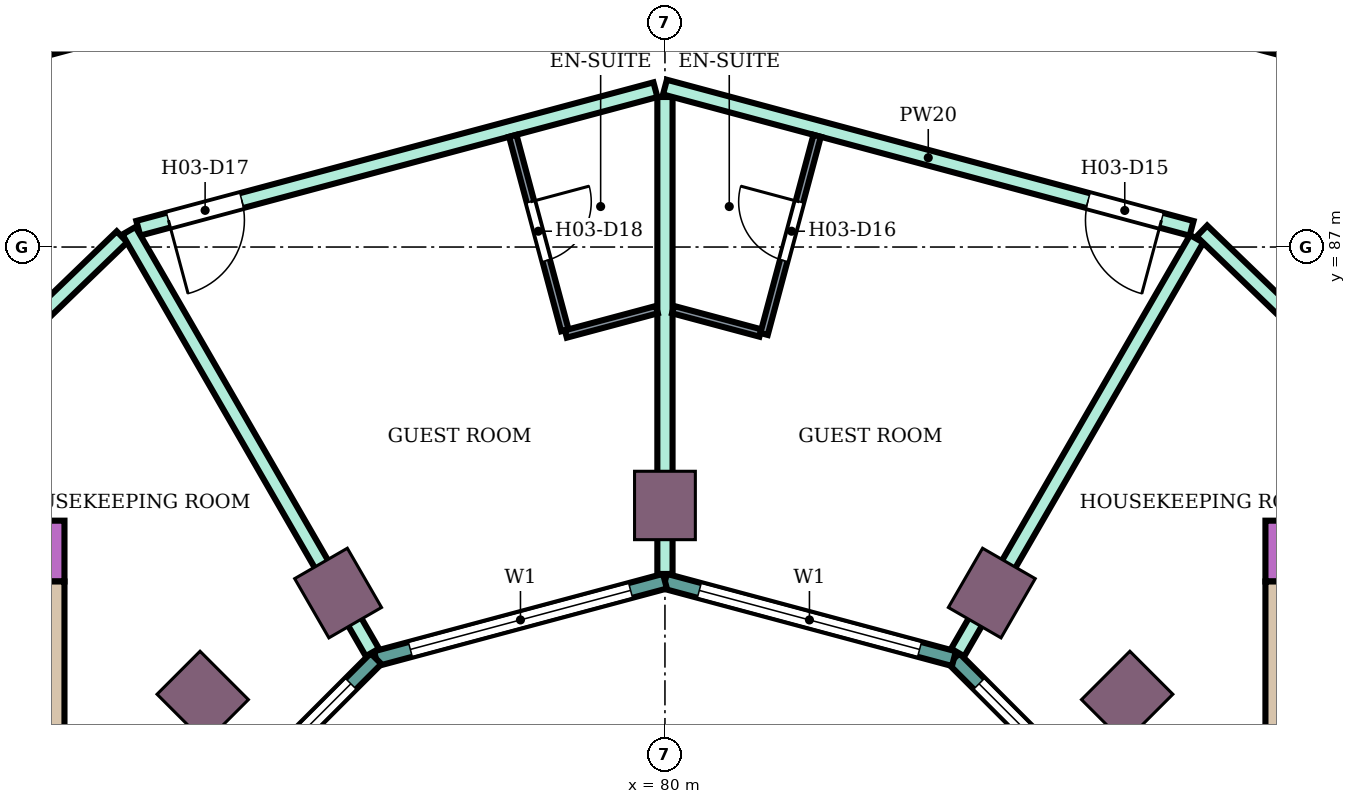
"""IFC4 building model, lengths in metres.
Left out: names, types, materials, properties, quantities, classifications, styles, units other than length and angle.
Written with IfcOpenShell. Run it as: python <this file> out.ifc"""

import sys

from ifc_helpers import new_model, si_unit, direction, frame, frame_2d, origin, origin_2d, place, context, subcontext, project, spatial, rectangle, extrude, element, fill, save


model = new_model("IFC4")
c1 = context("Model", 3, precision=1e-05, world=origin(), true_north=direction((0.0, 1.0)))
c2 = subcontext(c1, "Body", "Model", "MODEL_VIEW")
j1 = project(units=[si_unit("LENGTHUNIT", "METRE"), si_unit("PLANEANGLEUNIT", "RADIAN")], contexts=[c1])
p1 = place(None, origin())
s1 = spatial("IfcSite", under=j1, at=p1, CompositionType="ELEMENT")
p2 = place(p1, origin())
s2 = spatial("IfcBuilding", under=s1, at=p2, CompositionType="ELEMENT")
p3 = place(p2, frame((0.0, 0.0, 59.2)))
s3 = spatial("IfcBuildingStorey", under=s2, at=p3, CompositionType="ELEMENT", Elevation=59.2)
for number, where, z_axis, x_axis in (
    (1, (86.081, 81.081, 0.0), (0.0, 0.0, 1.0), (0.707, 0.707, 0.0)),
    (2, (84.3, 82.448, 0.0), (0.0, 0.0, 1.0), (0.5, 0.866, 0.0)),
    (3, (80.0, 83.6, 0.0), (0.0, 0.0, 1.0), (0.0, 1.0, 0.0)),
    (4, (75.7, 82.448, 0.0), (0.0, 0.0, 1.0), (-0.5, 0.866, 0.0)),
    (5, (73.919, 81.081, 0.0), (0.0, 0.0, 1.0), (-0.707, 0.707, 0.0)),
):
    element("IfcColumn", number, at=place(p3, frame(where, z_axis=z_axis, x_axis=x_axis)), inside=s3, PredefinedType="COLUMN", context=c2, shape_type="SweptSolid", body=[
        extrude(rectangle(XDim=0.9, YDim=0.8, at=origin_2d()), origin(), (0.0, 0.0, 1.0), 3.8),
    ])
p4 = place(p3, frame((87.9, 83.0, 0.0), z_axis=(0.0, 0.0, 1.0), x_axis=(1.0, 0.0, 0.0)))
e6 = element("IfcWall", 6, at=p4, inside=s3, PredefinedType="SHEAR", context=c2, shape_type="SweptSolid", body=[
    extrude(rectangle(XDim=14.7, YDim=0.8, at=frame_2d((7.35, 0.0))), origin(), (0.0, 0.0, 1.0), 3.48),
])
p5 = place(p4, frame((4.2, 0.0, 0.0)))
e7 = element("IfcOpeningElement", 7, at=p5, cuts=e6, PredefinedType="OPENING", context=c2, shape_type="SweptSolid", body=[
    extrude(rectangle(XDim=2.4, YDim=2.4, at=frame_2d((1.2, 1.2))), frame((0.0, 0.41, 0.0), z_axis=(0.0, -1.0, 0.0), x_axis=(1.0, 0.0, 0.0)), (0.0, 0.0, 1.0), 0.82),
])
p6 = place(p3, frame((88.125, 75.0, 0.0), z_axis=(0.0, 0.0, 1.0), x_axis=(0.0, 1.0, 0.0)))
e8 = element("IfcWall", 8, at=p6, inside=s3, PredefinedType="SHEAR", context=c2, shape_type="SweptSolid", body=[
    extrude(rectangle(XDim=7.6, YDim=0.45, at=frame_2d((3.8, 0.0))), origin(), (0.0, 0.0, 1.0), 3.48),
])
p7 = place(p3, frame((72.1, 83.0, 0.0), z_axis=(0.0, 0.0, 1.0), x_axis=(-1.0, 0.0, 0.0)))
e9 = element("IfcWall", 9, at=p7, inside=s3, PredefinedType="SHEAR", context=c2, shape_type="SweptSolid", body=[
    extrude(rectangle(XDim=14.7, YDim=0.8, at=frame_2d((7.35, 0.0))), origin(), (0.0, 0.0, 1.0), 3.48),
])
p8 = place(p7, frame((4.2, 0.0, 0.0)))
e10 = element("IfcOpeningElement", 10, at=p8, cuts=e9, PredefinedType="OPENING", context=c2, shape_type="SweptSolid", body=[
    extrude(rectangle(XDim=2.4, YDim=2.4, at=frame_2d((1.2, 1.2))), frame((0.0, 0.41, 0.0), z_axis=(0.0, -1.0, 0.0), x_axis=(1.0, 0.0, 0.0)), (0.0, 0.0, 1.0), 0.82),
])
p9 = place(p3, frame((71.875, 82.6, 0.0), z_axis=(0.0, 0.0, 1.0), x_axis=(0.0, -1.0, 0.0)))
e11 = element("IfcWall", 11, at=p9, inside=s3, PredefinedType="SHEAR", context=c2, shape_type="SweptSolid", body=[
    extrude(rectangle(XDim=7.6, YDim=0.45, at=frame_2d((3.8, 0.0))), origin(), (0.0, 0.0, 1.0), 3.48),
])
p10 = place(p3, frame((86.585, 78.802, 0.0), z_axis=(0.0, 0.0, 1.0), x_axis=(-0.707106781187, 0.707106781187, 0.0)))
e12 = element("IfcWall", 12, at=p10, inside=s3, PredefinedType="NOTDEFINED", context=c2, shape_type="SweptSolid", body=[
    extrude(rectangle(XDim=3.936, YDim=0.2, at=frame_2d((1.968, 0.0))), origin(), (0.0, 0.0, 1.0), 3.8),
])
p11 = place(p10, frame((0.468, 0.0, 0.9)))
e13 = element("IfcOpeningElement", 13, at=p11, cuts=e12, PredefinedType="OPENING", context=c2, shape_type="SweptSolid", body=[
    extrude(rectangle(XDim=3.0, YDim=2.3, at=frame_2d((1.5, 1.15))), frame((0.0, 0.11, 0.0), z_axis=(0.0, -1.0, 0.0), x_axis=(1.0, 0.0, 0.0)), (0.0, 0.0, 1.0), 0.22),
])
p12 = place(p3, frame((83.802, 81.585, 0.0), z_axis=(0.0, 0.0, 1.0), x_axis=(-0.965933654434, 0.258789828301, 0.0)))
e14 = element("IfcWall", 14, at=p12, inside=s3, PredefinedType="NOTDEFINED", context=c2, shape_type="SweptSolid", body=[
    extrude(rectangle(XDim=3.936, YDim=0.2, at=frame_2d((1.968, 0.0))), origin(), (0.0, 0.0, 1.0), 3.8),
])
p13 = place(p12, frame((0.468, 0.0, 0.9)))
e15 = element("IfcOpeningElement", 15, at=p13, cuts=e14, PredefinedType="OPENING", context=c2, shape_type="SweptSolid", body=[
    extrude(rectangle(XDim=3.0, YDim=2.3, at=frame_2d((1.5, 1.15))), frame((0.0, 0.11, 0.0), z_axis=(0.0, -1.0, 0.0), x_axis=(1.0, 0.0, 0.0)), (0.0, 0.0, 1.0), 0.22),
])
p14 = place(p3, frame((80.0, 82.604, 0.0), z_axis=(0.0, 0.0, 1.0), x_axis=(-0.965933654434, -0.258789828301, 0.0)))
e16 = element("IfcWall", 16, at=p14, inside=s3, PredefinedType="NOTDEFINED", context=c2, shape_type="SweptSolid", body=[
    extrude(rectangle(XDim=3.936, YDim=0.2, at=frame_2d((1.968, 0.0))), origin(), (0.0, 0.0, 1.0), 3.8),
])
p15 = place(p14, frame((0.468, 0.0, 0.9)))
e17 = element("IfcOpeningElement", 17, at=p15, cuts=e16, PredefinedType="OPENING", context=c2, shape_type="SweptSolid", body=[
    extrude(rectangle(XDim=3.0, YDim=2.3, at=frame_2d((1.5, 1.15))), frame((0.0, 0.11, 0.0), z_axis=(0.0, -1.0, 0.0), x_axis=(1.0, 0.0, 0.0)), (0.0, 0.0, 1.0), 0.22),
])
p16 = place(p3, frame((76.198, 81.585, 0.0), z_axis=(0.0, 0.0, 1.0), x_axis=(-0.707106781187, -0.707106781187, 0.0)))
e18 = element("IfcWall", 18, at=p16, inside=s3, PredefinedType="NOTDEFINED", context=c2, shape_type="SweptSolid", body=[
    extrude(rectangle(XDim=3.936, YDim=0.2, at=frame_2d((1.968, 0.0))), origin(), (0.0, 0.0, 1.0), 3.8),
])
p17 = place(p16, frame((0.468, 0.0, 0.9)))
e19 = element("IfcOpeningElement", 19, at=p17, cuts=e18, PredefinedType="OPENING", context=c2, shape_type="SweptSolid", body=[
    extrude(rectangle(XDim=3.0, YDim=2.3, at=frame_2d((1.5, 1.15))), frame((0.0, 0.11, 0.0), z_axis=(0.0, -1.0, 0.0), x_axis=(1.0, 0.0, 0.0)), (0.0, 0.0, 1.0), 0.22),
])
p18 = place(p3, frame((68.987, 83.4, 0.0), z_axis=(0.0, 0.0, 1.0), x_axis=(0.719547721855, 0.694442996922, 0.0)))
e20 = element("IfcWall", 20, at=p18, inside=s3, PredefinedType="PARTITIONING", context=c2, shape_type="SweptSolid", body=[
    extrude(rectangle(XDim=5.378, YDim=0.2, at=frame_2d((2.689, 0.0))), origin(), (0.0, 0.0, 1.0), 3.35),
])
p19 = place(p18, frame((2.294, 0.0, 0.0)))
e21 = element("IfcOpeningElement", 21, at=p19, cuts=e20, PredefinedType="OPENING", context=c2, shape_type="SweptSolid", body=[
    extrude(rectangle(XDim=0.9, YDim=2.1, at=frame_2d((0.45, 1.05))), frame((0.0, 0.11, 0.0), z_axis=(0.0, -1.0, 0.0), x_axis=(1.0, 0.0, 0.0)), (0.0, 0.0, 1.0), 0.22),
])
p20 = place(p3, frame((71.614, 89.55, 0.0), z_axis=(0.0, 0.0, 1.0), x_axis=(0.965967958589, 0.258661753994, 0.0)))
e22 = element("IfcWall", 22, at=p20, inside=s3, PredefinedType="PARTITIONING", context=c2, shape_type="SweptSolid", body=[
    extrude(rectangle(XDim=8.592, YDim=0.2, at=frame_2d((4.296, 0.0))), origin(), (0.0, 0.0, 1.0), 3.35),
])
p21 = place(p20, frame((0.55, 0.0, 0.0)))
e23 = element("IfcOpeningElement", 23, at=p21, cuts=e22, PredefinedType="OPENING", context=c2, shape_type="SweptSolid", body=[
    extrude(rectangle(XDim=1.0, YDim=2.1, at=frame_2d((0.5, 1.05))), frame((0.0, 0.11, 0.0), z_axis=(0.0, -1.0, 0.0), x_axis=(1.0, 0.0, 0.0)), (0.0, 0.0, 1.0), 0.22),
])
p22 = place(p3, frame((73.071, 87.247, 0.0), z_axis=(0.0, 0.0, 1.0), x_axis=(0.965931651205, 0.258797305243, 0.0)))
e24 = element("IfcWall", 24, at=p22, inside=s3, PredefinedType="PARTITIONING", context=c2, shape_type="SweptSolid", body=[
    extrude(rectangle(XDim=7.043, YDim=0.2, at=frame_2d((3.521, 0.0))), origin(), (0.0, 0.0, 1.0), 3.35),
])
p23 = place(p22, frame((0.41, 0.0, 0.0)))
e25 = element("IfcOpeningElement", 25, at=p23, cuts=e24, PredefinedType="OPENING", context=c2, shape_type="SweptSolid", body=[
    extrude(rectangle(XDim=1.0, YDim=2.1, at=frame_2d((0.5, 1.05))), frame((0.0, 0.11, 0.0), z_axis=(0.0, -1.0, 0.0), x_axis=(1.0, 0.0, 0.0)), (0.0, 0.0, 1.0), 0.22),
])
p24 = place(p3, frame((72.949, 87.214, 0.0), z_axis=(0.0, 0.0, 1.0), x_axis=(0.499927021214, -0.866067534006, 0.0)))
e26 = element("IfcWall", 26, at=p24, inside=s3, PredefinedType="PARTITIONING", context=c2, shape_type="SweptSolid", body=[
    extrude(rectangle(XDim=6.405, YDim=0.2, at=frame_2d((3.203, 0.0))), origin(), (0.0, 0.0, 1.0), 3.35),
])
p25 = place(p3, frame((80.0, 82.699, 0.0), z_axis=(0.0, 0.0, 1.0), x_axis=(0.0, 1.0, 0.0)))
e27 = element("IfcWall", 27, at=p25, inside=s3, PredefinedType="PARTITIONING", context=c2, shape_type="SweptSolid", body=[
    extrude(rectangle(XDim=6.275, YDim=0.2, at=frame_2d((3.138, 0.0))), origin(), (0.0, 0.0, 1.0), 3.35),
])
p26 = place(p3, frame((80.0, 89.104, 0.0), z_axis=(0.0, 0.0, 1.0), x_axis=(0.965856548257, -0.259077455964, 0.0)))
e28 = element("IfcWall", 28, at=p26, inside=s3, PredefinedType="PARTITIONING", context=c2, shape_type="SweptSolid", body=[
    extrude(rectangle(XDim=7.173, YDim=0.2, at=frame_2d((3.586, 0.0))), origin(), (0.0, 0.0, 1.0), 3.35),
])
p27 = place(p26, frame((5.763, 0.0, 0.0)))
e29 = element("IfcOpeningElement", 29, at=p27, cuts=e28, PredefinedType="OPENING", context=c2, shape_type="SweptSolid", body=[
    extrude(rectangle(XDim=1.0, YDim=2.1, at=frame_2d((0.5, 1.05))), frame((0.0, 0.11, 0.0), z_axis=(0.0, -1.0, 0.0), x_axis=(1.0, 0.0, 0.0)), (0.0, 0.0, 1.0), 0.22),
])
p28 = place(p3, frame((80.0, 91.797, 0.0), z_axis=(0.0, 0.0, 1.0), x_axis=(0.965857042792, -0.259075612301, 0.0)))
e30 = element("IfcWall", 30, at=p28, inside=s3, PredefinedType="PARTITIONING", context=c2, shape_type="SweptSolid", body=[
    extrude(rectangle(XDim=8.602, YDim=0.2, at=frame_2d((4.301, 0.0))), origin(), (0.0, 0.0, 1.0), 3.35),
])
p29 = place(p28, frame((4.877, 0.0, 0.0)))
e31 = element("IfcOpeningElement", 31, at=p29, cuts=e30, PredefinedType="OPENING", context=c2, shape_type="SweptSolid", body=[
    extrude(rectangle(XDim=1.0, YDim=2.1, at=frame_2d((0.5, 1.05))), frame((0.0, 0.11, 0.0), z_axis=(0.0, -1.0, 0.0), x_axis=(1.0, 0.0, 0.0)), (0.0, 0.0, 1.0), 0.22),
])
p30 = place(p28, frame((2.817, 0.0, 0.0)))
e32 = element("IfcOpeningElement", 32, at=p30, cuts=e30, PredefinedType="OPENING", context=c2, shape_type="SweptSolid", body=[
    extrude(rectangle(XDim=1.0, YDim=2.1, at=frame_2d((0.5, 1.05))), frame((0.0, 0.11, 0.0), z_axis=(0.0, -1.0, 0.0), x_axis=(1.0, 0.0, 0.0)), (0.0, 0.0, 1.0), 0.22),
])
p31 = place(p3, frame((83.851, 81.666, 0.0), z_axis=(0.0, 0.0, 1.0), x_axis=(0.500253653624, 0.865878907259, 0.0)))
e33 = element("IfcWall", 33, at=p31, inside=s3, PredefinedType="PARTITIONING", context=c2, shape_type="SweptSolid", body=[
    extrude(rectangle(XDim=6.285, YDim=0.2, at=frame_2d((3.143, 0.0))), origin(), (0.0, 0.0, 1.0), 3.35),
])
p32 = place(p3, frame((87.064, 87.211, 0.0), z_axis=(0.0, 0.0, 1.0), x_axis=(0.719562412484, -0.694427774891, 0.0)))
e34 = element("IfcWall", 34, at=p32, inside=s3, PredefinedType="PARTITIONING", context=c2, shape_type="SweptSolid", body=[
    extrude(rectangle(XDim=5.488, YDim=0.2, at=frame_2d((2.744, 0.0))), origin(), (0.0, 0.0, 1.0), 3.35),
])
p33 = place(p32, frame((2.294, 0.0, 0.0)))
e35 = element("IfcOpeningElement", 35, at=p33, cuts=e34, PredefinedType="OPENING", context=c2, shape_type="SweptSolid", body=[
    extrude(rectangle(XDim=0.9, YDim=2.1, at=frame_2d((0.45, 1.05))), frame((0.0, 0.11, 0.0), z_axis=(0.0, -1.0, 0.0), x_axis=(1.0, 0.0, 0.0)), (0.0, 0.0, 1.0), 0.22),
])
p34 = place(p3, frame((77.998, 88.463, 0.0), z_axis=(0.0, 0.0, 1.0), x_axis=(0.258677737588, -0.965963678446, 0.0)))
e36 = element("IfcWall", 36, at=p34, inside=s3, PredefinedType="PARTITIONING", context=c2, shape_type="SweptSolid", body=[
    extrude(rectangle(XDim=2.649, YDim=0.1, at=frame_2d((1.325, 0.0))), origin(), (0.0, 0.0, 1.0), 3.35),
])
p35 = place(p34, frame((0.9, 0.0, 0.0)))
e37 = element("IfcOpeningElement", 37, at=p35, cuts=e36, PredefinedType="OPENING", context=c2, shape_type="SweptSolid", body=[
    extrude(rectangle(XDim=0.8, YDim=2.1, at=frame_2d((0.4, 1.05))), frame((0.0, 0.06, 0.0), z_axis=(0.0, -1.0, 0.0), x_axis=(1.0, 0.0, 0.0)), (0.0, 0.0, 1.0), 0.12),
])
p36 = place(p3, frame((78.696, 85.856, 0.0), z_axis=(0.0, 0.0, 1.0), x_axis=(0.966002513606, 0.258532674351, 0.0)))
e38 = element("IfcWall", 38, at=p36, inside=s3, PredefinedType="PARTITIONING", context=c2, shape_type="SweptSolid", body=[
    extrude(rectangle(XDim=1.24, YDim=0.1, at=frame_2d((0.62, 0.0))), origin(), (0.0, 0.0, 1.0), 3.35),
])
p37 = place(p3, frame((80.106, 86.177, 0.0), z_axis=(0.0, 0.0, 1.0), x_axis=(0.966002973184, -0.258530957139, 0.0)))
e39 = element("IfcWall", 39, at=p37, inside=s3, PredefinedType="PARTITIONING", context=c2, shape_type="SweptSolid", body=[
    extrude(rectangle(XDim=1.19, YDim=0.1, at=frame_2d((0.595, 0.0))), origin(), (0.0, 0.0, 1.0), 3.35),
])
p38 = place(p3, frame((81.304, 85.856, 0.0), z_axis=(0.0, 0.0, 1.0), x_axis=(0.25867580527, 0.965964195904, 0.0)))
e40 = element("IfcWall", 40, at=p38, inside=s3, PredefinedType="PARTITIONING", context=c2, shape_type="SweptSolid", body=[
    extrude(rectangle(XDim=2.699, YDim=0.1, at=frame_2d((1.35, 0.0))), origin(), (0.0, 0.0, 1.0), 3.35),
])
p39 = place(p38, frame((1.0, 0.0, 0.0)))
e41 = element("IfcOpeningElement", 41, at=p39, cuts=e40, PredefinedType="OPENING", context=c2, shape_type="SweptSolid", body=[
    extrude(rectangle(XDim=0.8, YDim=2.1, at=frame_2d((0.4, 1.05))), frame((0.0, 0.06, 0.0), z_axis=(0.0, -1.0, 0.0), x_axis=(1.0, 0.0, 0.0)), (0.0, 0.0, 1.0), 0.12),
])
p40 = place(p11, origin())
e42 = element("IfcWindow", 42, at=p40, inside=s3, PartitioningType="SINGLE_PANEL", PredefinedType="WINDOW", context=c2, shape_type="SweptSolid", body=[
    extrude(rectangle(XDim=3.0, YDim=2.3, at=frame_2d((1.5, 1.15))), frame((0.0, 0.03, 0.0), z_axis=(0.0, -1.0, 0.0), x_axis=(1.0, 0.0, 0.0)), (0.0, 0.0, 1.0), 0.06),
])
fill(e13, e42)
p41 = place(p13, origin())
e43 = element("IfcWindow", 43, at=p41, inside=s3, PartitioningType="SINGLE_PANEL", PredefinedType="WINDOW", context=c2, shape_type="SweptSolid", body=[
    extrude(rectangle(XDim=3.0, YDim=2.3, at=frame_2d((1.5, 1.15))), frame((0.0, 0.03, 0.0), z_axis=(0.0, -1.0, 0.0), x_axis=(1.0, 0.0, 0.0)), (0.0, 0.0, 1.0), 0.06),
])
fill(e15, e43)
p42 = place(p15, origin())
e44 = element("IfcWindow", 44, at=p42, inside=s3, PartitioningType="SINGLE_PANEL", PredefinedType="WINDOW", context=c2, shape_type="SweptSolid", body=[
    extrude(rectangle(XDim=3.0, YDim=2.3, at=frame_2d((1.5, 1.15))), frame((0.0, 0.03, 0.0), z_axis=(0.0, -1.0, 0.0), x_axis=(1.0, 0.0, 0.0)), (0.0, 0.0, 1.0), 0.06),
])
fill(e17, e44)
p43 = place(p17, origin())
e45 = element("IfcWindow", 45, at=p43, inside=s3, PartitioningType="SINGLE_PANEL", PredefinedType="WINDOW", context=c2, shape_type="SweptSolid", body=[
    extrude(rectangle(XDim=3.0, YDim=2.3, at=frame_2d((1.5, 1.15))), frame((0.0, 0.03, 0.0), z_axis=(0.0, -1.0, 0.0), x_axis=(1.0, 0.0, 0.0)), (0.0, 0.0, 1.0), 0.06),
])
fill(e19, e45)
p44 = place(p27, frame((1.0, 0.0, 0.0), z_axis=(0.0, 0.0, 1.0), x_axis=(-1.0, 0.0, 0.0)))
e46 = element("IfcDoor", 46, at=p44, inside=s3, OperationType="SINGLE_SWING_LEFT", PredefinedType="DOOR", context=c2, shape_type="SweptSolid", body=[
    extrude(rectangle(XDim=1.0, YDim=2.1, at=frame_2d((0.5, 1.05))), frame((0.0, 0.025, 0.0), z_axis=(0.0, -1.0, 0.0), x_axis=(1.0, 0.0, 0.0)), (0.0, 0.0, 1.0), 0.05),
])
fill(e29, e46)
p45 = place(p39, origin())
e47 = element("IfcDoor", 47, at=p45, inside=s3, OperationType="SINGLE_SWING_RIGHT", PredefinedType="DOOR", context=c2, shape_type="SweptSolid", body=[
    extrude(rectangle(XDim=0.8, YDim=2.1, at=frame_2d((0.4, 1.05))), frame((0.0, 0.025, 0.0), z_axis=(0.0, -1.0, 0.0), x_axis=(1.0, 0.0, 0.0)), (0.0, 0.0, 1.0), 0.05),
])
fill(e41, e47)
p46 = place(p23, frame((1.0, 0.0, 0.0), z_axis=(0.0, 0.0, 1.0), x_axis=(-1.0, 0.0, 0.0)))
e48 = element("IfcDoor", 48, at=p46, inside=s3, OperationType="SINGLE_SWING_RIGHT", PredefinedType="DOOR", context=c2, shape_type="SweptSolid", body=[
    extrude(rectangle(XDim=1.0, YDim=2.1, at=frame_2d((0.5, 1.05))), frame((0.0, 0.025, 0.0), z_axis=(0.0, -1.0, 0.0), x_axis=(1.0, 0.0, 0.0)), (0.0, 0.0, 1.0), 0.05),
])
fill(e25, e48)
p47 = place(p35, origin())
e49 = element("IfcDoor", 49, at=p47, inside=s3, OperationType="SINGLE_SWING_LEFT", PredefinedType="DOOR", context=c2, shape_type="SweptSolid", body=[
    extrude(rectangle(XDim=0.8, YDim=2.1, at=frame_2d((0.4, 1.05))), frame((0.0, 0.025, 0.0), z_axis=(0.0, -1.0, 0.0), x_axis=(1.0, 0.0, 0.0)), (0.0, 0.0, 1.0), 0.05),
])
fill(e37, e49)
save(model, sys.argv[1])
